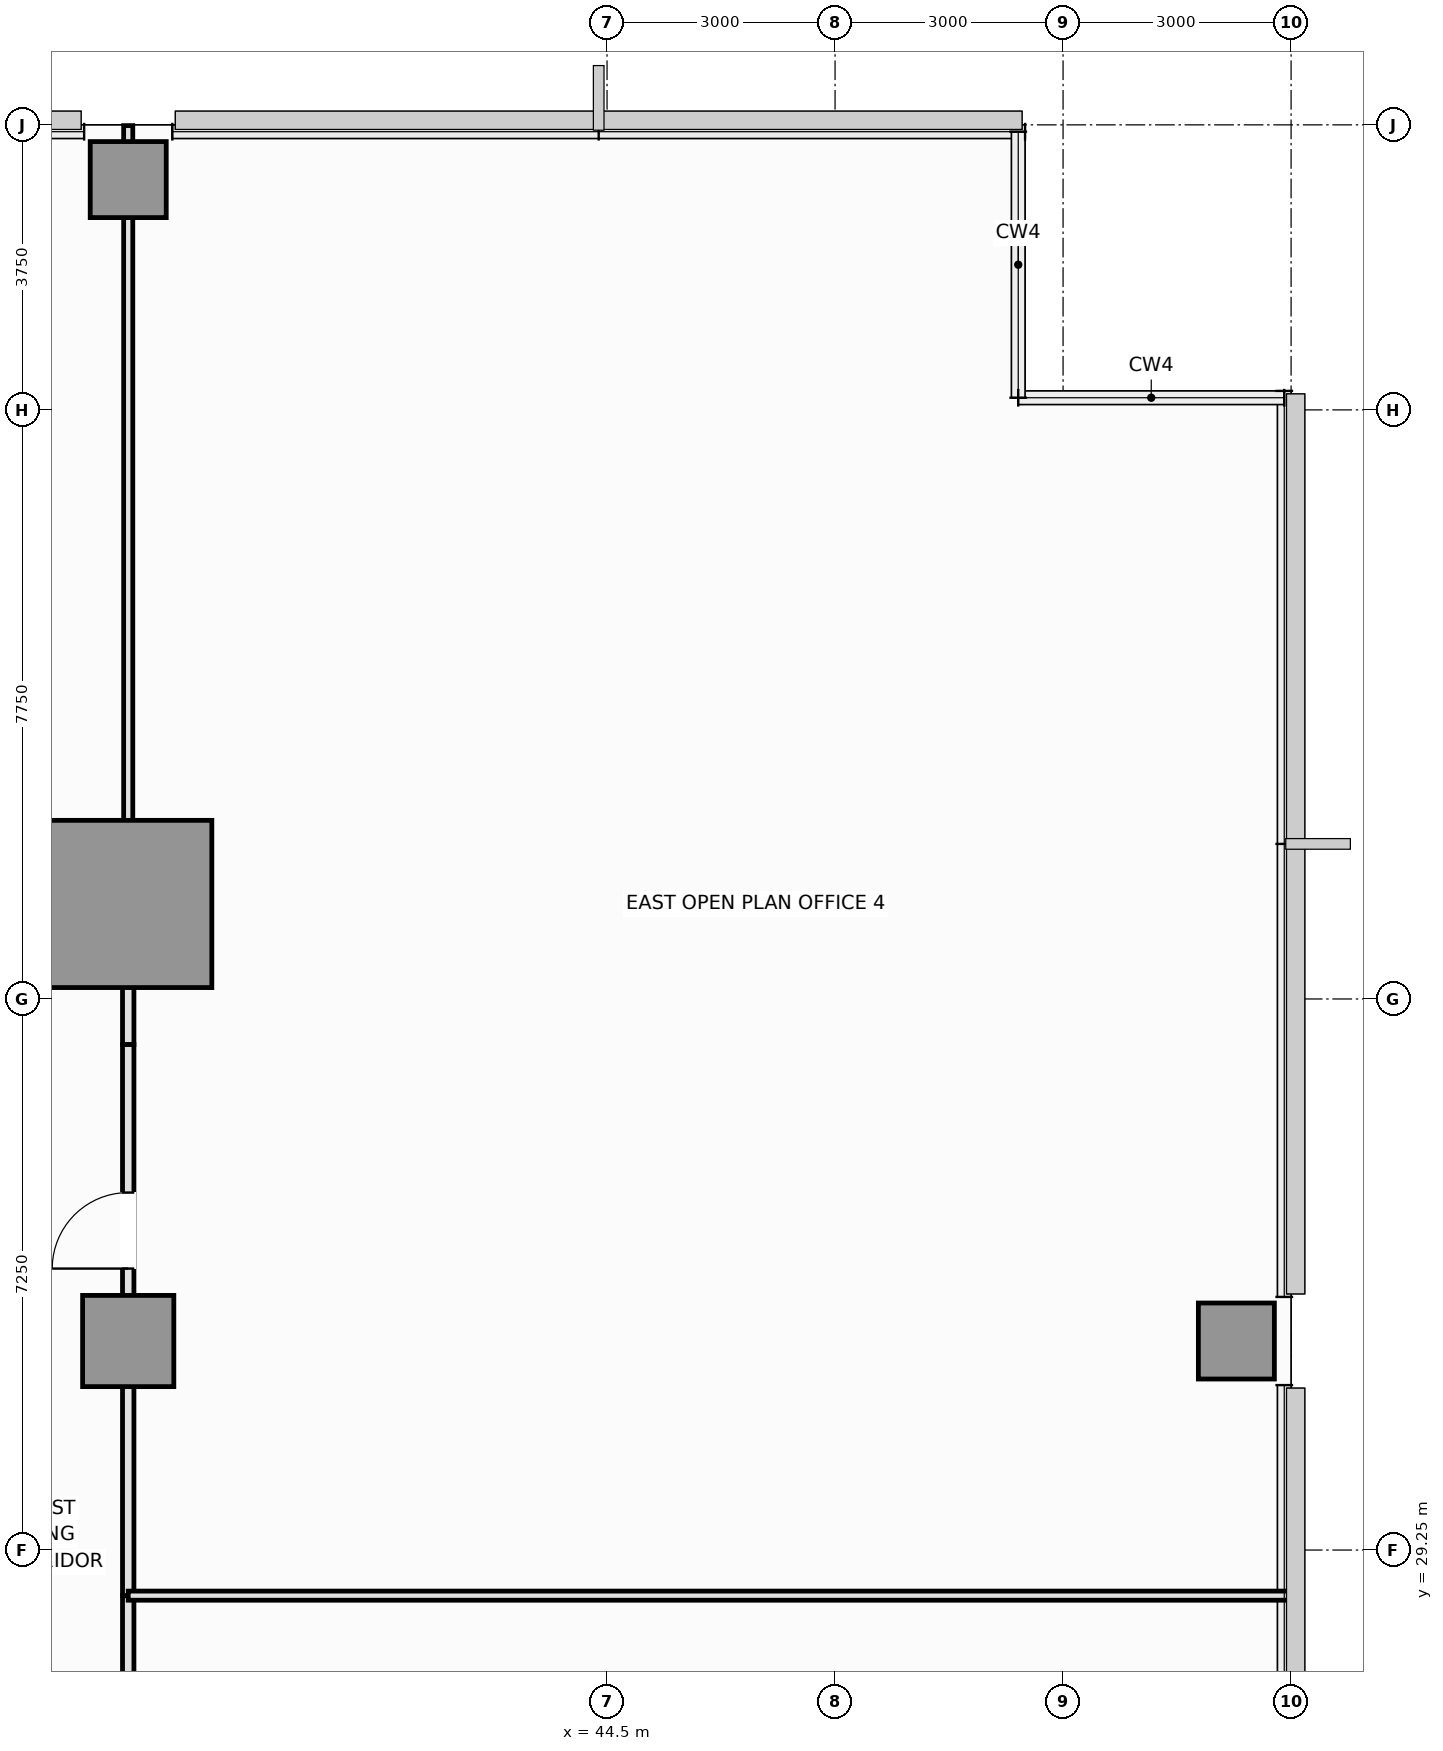
"""IFC4 building model, lengths in metres.
Left out: names, types, materials, properties, quantities, classifications, styles, units other than length and angle.
Written with IfcOpenShell. Run it as: python <this file> out.ifc"""

import sys

from ifc_helpers import new_model, si_unit, direction, frame, frame_2d, origin, origin_2d, place, context, subcontext, project, spatial, rectangle, extrude, element, fill, save


model = new_model("IFC4")
c1 = context("Model", 3, precision=1e-05, world=origin(), true_north=direction((0.0, 1.0)))
c2 = subcontext(c1, "Body", "Model", "MODEL_VIEW")
j1 = project(units=[si_unit("LENGTHUNIT", "METRE"), si_unit("PLANEANGLEUNIT", "RADIAN")], contexts=[c1])
p1 = place(None, origin())
s1 = spatial("IfcSite", under=j1, at=p1, CompositionType="ELEMENT")
p2 = place(p1, origin())
s2 = spatial("IfcBuilding", under=s1, at=p2, CompositionType="ELEMENT")
p3 = place(p2, frame((0.0, 0.0, 61.1)))
s3 = spatial("IfcBuildingStorey", under=s2, at=p3, CompositionType="ELEMENT", Elevation=61.1)
p4 = place(p3, frame((38.2, 37.75, 0.0), z_axis=(0.0, 0.0, 1.0), x_axis=(1.0, 0.0, 0.0)))
e1 = element("IfcColumn", 1, at=p4, inside=s3, PredefinedType="COLUMN", context=c2, shape_type="SweptSolid", body=[
    extrude(rectangle(XDim=2.2, YDim=2.2, at=origin_2d()), origin(), (0.0, 0.0, 1.0), 3.55),
])
p5 = place(p3, frame((38.2, 32.0, 0.0), z_axis=(0.0, 0.0, 1.0), x_axis=(1.0, 0.0, 0.0)))
e2 = element("IfcColumn", 2, at=p5, inside=s3, PredefinedType="COLUMN", context=c2, shape_type="SweptSolid", body=[
    extrude(rectangle(XDim=1.2, YDim=1.2, at=origin_2d()), origin(), (0.0, 0.0, 1.0), 3.55),
])
for number, where, z_axis, x_axis in (
    (3, (52.78, 32.0, 0.0), (0.0, 0.0, 1.0), (1.0, 0.0, 0.0)),
    (4, (38.2, 47.28, 0.0), (0.0, 0.0, 1.0), (1.0, 0.0, 0.0)),
):
    element("IfcColumn", number, at=place(p3, frame(where, z_axis=z_axis, x_axis=x_axis)), inside=s3, PredefinedType="COLUMN", context=c2, shape_type="SweptSolid", body=[
        extrude(rectangle(XDim=1.0, YDim=1.0, at=origin_2d()), origin(), (0.0, 0.0, 1.0), 3.55),
    ])
p6 = place(p3, frame((33.0, 37.8, 0.0), z_axis=(0.0, 0.0, 1.0), x_axis=(1.0, 0.0, 0.0)))
e5 = element("IfcWall", 5, at=p6, inside=s3, PredefinedType="PARTITIONING", context=c2, shape_type="SweptSolid", body=[
    extrude(rectangle(XDim=5.2, YDim=0.15, at=frame_2d((2.6, 0.0))), origin(), (0.0, 0.0, 1.0), 2.72),
])
p7 = place(p6, frame((2.1, 0.0, 0.0)))
e6 = element("IfcOpeningElement", 6, at=p7, cuts=e5, PredefinedType="OPENING", context=c2, shape_type="SweptSolid", body=[
    extrude(rectangle(XDim=1.0, YDim=2.15, at=frame_2d((0.5, 1.075))), frame((0.0, 0.085, 0.0), z_axis=(0.0, -1.0, 0.0), x_axis=(1.0, 0.0, 0.0)), (0.0, 0.0, 1.0), 0.17),
])
p8 = place(p3, frame((38.2, 35.9, 0.0), z_axis=(0.0, 0.0, 1.0), x_axis=(0.0, 1.0, 0.0)))
e7 = element("IfcWall", 7, at=p8, inside=s3, PredefinedType="PARTITIONING", context=c2, shape_type="SweptSolid", body=[
    extrude(rectangle(XDim=1.9, YDim=0.15, at=frame_2d((0.95, 0.0))), origin(), (0.0, 0.0, 1.0), 2.82),
])
p9 = place(p3, frame((38.2, 25.25, 0.0), z_axis=(0.0, 0.0, 1.0), x_axis=(0.0, 1.0, 0.0)))
e8 = element("IfcWall", 8, at=p9, inside=s3, PredefinedType="PARTITIONING", context=c2, shape_type="SweptSolid", body=[
    extrude(rectangle(XDim=3.4, YDim=0.15, at=frame_2d((1.7, 0.0))), origin(), (0.0, 0.0, 1.0), 2.82),
])
p10 = place(p9, frame((1.2, 0.0, 0.0)))
e9 = element("IfcOpeningElement", 9, at=p10, cuts=e8, PredefinedType="OPENING", context=c2, shape_type="SweptSolid", body=[
    extrude(rectangle(XDim=1.0, YDim=2.15, at=frame_2d((0.5, 1.075))), frame((0.0, 0.085, 0.0), z_axis=(0.0, -1.0, 0.0), x_axis=(1.0, 0.0, 0.0)), (0.0, 0.0, 1.0), 0.17),
])
p11 = place(p3, frame((38.2, 28.65, 0.0), z_axis=(0.0, 0.0, 1.0), x_axis=(0.0, 1.0, 0.0)))
e10 = element("IfcWall", 10, at=p11, inside=s3, PredefinedType="PARTITIONING", context=c2, shape_type="SweptSolid", body=[
    extrude(rectangle(XDim=7.25, YDim=0.15, at=frame_2d((3.625, 0.0))), origin(), (0.0, 0.0, 1.0), 2.82),
])
p12 = place(p11, frame((4.303, 0.0, 0.0)))
e11 = element("IfcOpeningElement", 11, at=p12, cuts=e10, PredefinedType="OPENING", context=c2, shape_type="SweptSolid", body=[
    extrude(rectangle(XDim=1.0, YDim=2.15, at=frame_2d((0.5, 1.075))), frame((0.0, 0.085, 0.0), z_axis=(0.0, -1.0, 0.0), x_axis=(1.0, 0.0, 0.0)), (0.0, 0.0, 1.0), 0.17),
])
p13 = place(p3, frame((38.2, 37.8, 0.0), z_axis=(0.0, 0.0, 1.0), x_axis=(0.0, 1.0, 0.0)))
e12 = element("IfcWall", 12, at=p13, inside=s3, PredefinedType="PARTITIONING", context=c2, shape_type="SweptSolid", body=[
    extrude(rectangle(XDim=10.19, YDim=0.12, at=frame_2d((5.095, 0.0))), origin(), (0.0, 0.0, 1.0), 2.82),
])
p14 = place(p3, frame((38.2, 28.65, 0.0), z_axis=(0.0, 0.0, 1.0), x_axis=(1.0, 0.0, 0.0)))
e13 = element("IfcWall", 13, at=p14, inside=s3, PredefinedType="PARTITIONING", context=c2, shape_type="SweptSolid", body=[
    extrude(rectangle(XDim=15.29, YDim=0.12, at=frame_2d((7.645, 0.0))), origin(), (0.0, 0.0, 1.0), 3.37),
])
p15 = place(p12, origin())
e14 = element("IfcDoor", 14, at=p15, inside=s3, OperationType="SINGLE_SWING_LEFT", PredefinedType="DOOR", context=c2, shape_type="SweptSolid", body=[
    extrude(rectangle(XDim=1.0, YDim=2.15, at=frame_2d((0.5, 1.075))), frame((0.0, 0.025, 0.0), z_axis=(0.0, -1.0, 0.0), x_axis=(1.0, 0.0, 0.0)), (0.0, 0.0, 1.0), 0.05),
])
fill(e11, e14)
save(model, sys.argv[1])
